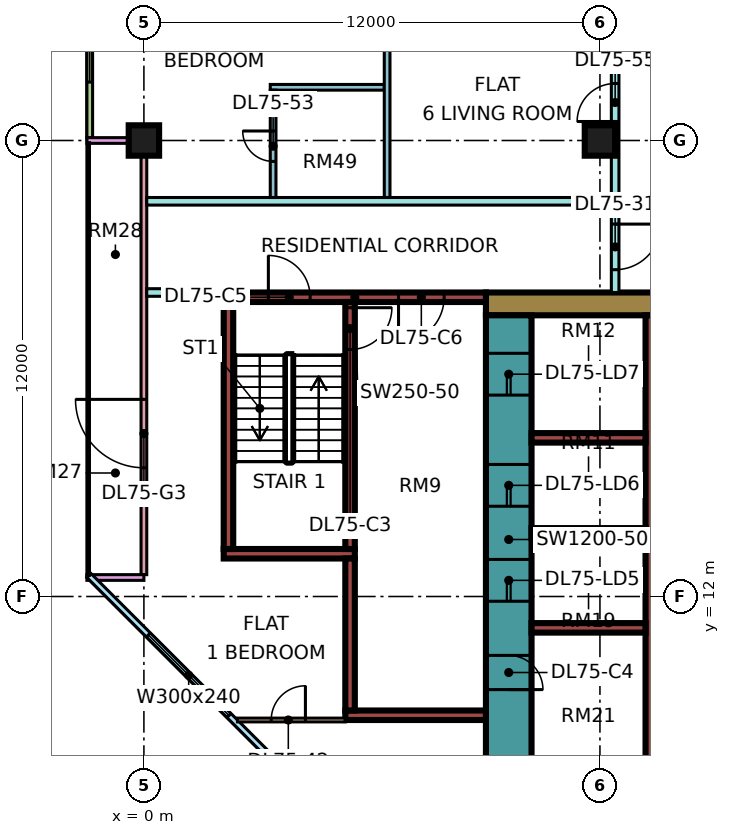
"""IFC4 building model, lengths in metres.
Left out: names, types, materials, properties, quantities, classifications, styles, units other than length and angle.
Written with IfcOpenShell. Run it as: python <this file> out.ifc"""

import sys

from ifc_helpers import new_model, si_unit, direction, frame, frame_2d, origin, origin_2d, place, context, subcontext, project, spatial, rectangle, extrude, element, fill, save


model = new_model("IFC4")
c1 = context("Model", 3, precision=1e-05, world=origin(), true_north=direction((0.0, 1.0)))
c2 = subcontext(c1, "Body", "Model", "MODEL_VIEW")
j1 = project(units=[si_unit("LENGTHUNIT", "METRE"), si_unit("PLANEANGLEUNIT", "RADIAN")], contexts=[c1])
p1 = place(None, origin())
s1 = spatial("IfcSite", under=j1, at=p1, CompositionType="ELEMENT")
p2 = place(p1, origin())
s2 = spatial("IfcBuilding", under=s1, at=p2, CompositionType="ELEMENT")
p3 = place(p2, frame((0.0, 0.0, 318.4)))
s3 = spatial("IfcBuildingStorey", under=s2, at=p3, CompositionType="ELEMENT", Elevation=318.4)
for number, where, z_axis, x_axis in (
    (1, (0.0, 24.0, 0.0), (0.0, 0.0, 1.0), (1.0, 0.0, 0.0)),
    (2, (12.0, 24.0, 0.0), (0.0, 0.0, 1.0), (1.0, 0.0, 0.0)),
):
    element("IfcColumn", number, at=place(p3, frame(where, z_axis=z_axis, x_axis=x_axis)), inside=s3, PredefinedType="COLUMN", context=c2, shape_type="SweptSolid", body=[
        extrude(rectangle(XDim=0.8, YDim=0.8, at=origin_2d()), origin(), (0.0, 0.0, 1.0), 3.75),
    ])
p4 = place(p3, frame((9.0, 19.7, 0.0), z_axis=(0.0, 0.0, 1.0), x_axis=(1.0, 0.0, 0.0)))
e3 = element("IfcWall", 3, at=p4, inside=s3, PredefinedType="SHEAR", context=c2, shape_type="SweptSolid", body=[
    extrude(rectangle(XDim=25.0, YDim=0.6, at=frame_2d((12.5, 0.0))), origin(), (0.0, 0.0, 1.0), 3.75),
])
p5 = place(p4, frame((19.1, 0.0, 0.0)))
e4 = element("IfcOpeningElement", 4, at=p5, cuts=e3, PredefinedType="OPENING", context=c2, shape_type="SweptSolid", body=[
    extrude(rectangle(XDim=1.8, YDim=2.4, at=frame_2d((0.9, 1.2))), frame((0.0, 0.31, 0.0), z_axis=(0.0, -1.0, 0.0), x_axis=(1.0, 0.0, 0.0)), (0.0, 0.0, 1.0), 0.62),
])
p6 = place(p3, frame((9.6, 7.6, 0.0), z_axis=(0.0, 0.0, 1.0), x_axis=(0.0, 1.0, 0.0)))
e5 = element("IfcWall", 5, at=p6, inside=s3, PredefinedType="SHEAR", context=c2, shape_type="SweptSolid", body=[
    extrude(rectangle(XDim=11.8, YDim=1.2, at=frame_2d((5.9, 0.0))), origin(), (0.0, 0.0, 1.0), 3.75),
])
p7 = place(p6, frame((4.275, 0.0, 0.0)))
e6 = element("IfcOpeningElement", 6, at=p7, cuts=e5, PredefinedType="OPENING", context=c2, shape_type="SweptSolid", body=[
    extrude(rectangle(XDim=1.1, YDim=2.2, at=frame_2d((0.55, 1.1))), frame((0.0, 0.61, 0.0), z_axis=(0.0, -1.0, 0.0), x_axis=(1.0, 0.0, 0.0)), (0.0, 0.0, 1.0), 1.22),
])
p8 = place(p6, frame((6.775, 0.0, 0.0)))
e7 = element("IfcOpeningElement", 7, at=p8, cuts=e5, PredefinedType="OPENING", context=c2, shape_type="SweptSolid", body=[
    extrude(rectangle(XDim=1.1, YDim=2.2, at=frame_2d((0.55, 1.1))), frame((0.0, 0.61, 0.0), z_axis=(0.0, -1.0, 0.0), x_axis=(1.0, 0.0, 0.0)), (0.0, 0.0, 1.0), 1.22),
])
p9 = place(p6, frame((9.7, 0.0, 0.0)))
e8 = element("IfcOpeningElement", 8, at=p9, cuts=e5, PredefinedType="OPENING", context=c2, shape_type="SweptSolid", body=[
    extrude(rectangle(XDim=1.1, YDim=2.2, at=frame_2d((0.55, 1.1))), frame((0.0, 0.61, 0.0), z_axis=(0.0, -1.0, 0.0), x_axis=(1.0, 0.0, 0.0)), (0.0, 0.0, 1.0), 1.22),
])
p10 = place(p6, frame((1.95, 0.0, 0.0)))
e9 = element("IfcOpeningElement", 9, at=p10, cuts=e5, PredefinedType="OPENING", context=c2, shape_type="SweptSolid", body=[
    extrude(rectangle(XDim=0.9, YDim=2.1, at=frame_2d((0.45, 1.05))), frame((0.0, 0.61, 0.0), z_axis=(0.0, -1.0, 0.0), x_axis=(1.0, 0.0, 0.0)), (0.0, 0.0, 1.0), 1.22),
])
p11 = place(p3, frame((13.325, 7.6, 0.0), z_axis=(0.0, 0.0, 1.0), x_axis=(0.0, 1.0, 0.0)))
e10 = element("IfcWall", 10, at=p11, inside=s3, PredefinedType="SHEAR", context=c2, shape_type="SweptSolid", body=[
    extrude(rectangle(XDim=11.8, YDim=0.25, at=frame_2d((5.9, 0.0))), origin(), (0.0, 0.0, 1.0), 3.75),
])
for number, where, z_axis, x_axis in (
    (11, (10.2, 11.175, 0.0), (0.0, 0.0, 1.0), (1.0, 0.0, 0.0)),
    (12, (10.2, 13.675, 0.0), (0.0, 0.0, 1.0), (1.0, 0.0, 0.0)),
    (13, (10.2, 16.175, 0.0), (0.0, 0.0, 1.0), (1.0, 0.0, 0.0)),
):
    element("IfcWall", number, at=place(p3, frame(where, z_axis=z_axis, x_axis=x_axis)), inside=s3, PredefinedType="SHEAR", context=c2, shape_type="SweptSolid", body=[
        extrude(rectangle(XDim=3.0, YDim=0.25, at=frame_2d((1.5, 0.0))), origin(), (0.0, 0.0, 1.0), 3.75),
    ])
p12 = place(p3, frame((2.1, 19.875, 0.0), z_axis=(0.0, 0.0, 1.0), x_axis=(1.0, 0.0, 0.0)))
e14 = element("IfcWall", 14, at=p12, inside=s3, PredefinedType="SHEAR", context=c2, shape_type="SweptSolid", body=[
    extrude(rectangle(XDim=6.9, YDim=0.25, at=frame_2d((3.45, 0.0))), origin(), (0.0, 0.0, 1.0), 3.75),
])
p13 = place(p12, frame((1.175, 0.0, 0.0)))
e15 = element("IfcOpeningElement", 15, at=p13, cuts=e14, PredefinedType="OPENING", context=c2, shape_type="SweptSolid", body=[
    extrude(rectangle(XDim=1.1, YDim=2.2, at=frame_2d((0.55, 1.1))), frame((0.0, 0.135, 0.0), z_axis=(0.0, -1.0, 0.0), x_axis=(1.0, 0.0, 0.0)), (0.0, 0.0, 1.0), 0.27),
])
p14 = place(p12, frame((4.6, 0.0, 0.0)))
e16 = element("IfcOpeningElement", 16, at=p14, cuts=e14, PredefinedType="OPENING", context=c2, shape_type="SweptSolid", body=[
    extrude(rectangle(XDim=1.2, YDim=2.2, at=frame_2d((0.6, 1.1))), frame((0.0, 0.135, 0.0), z_axis=(0.0, -1.0, 0.0), x_axis=(1.0, 0.0, 0.0)), (0.0, 0.0, 1.0), 0.27),
])
p15 = place(p3, frame((2.1, 13.125, 0.0), z_axis=(0.0, 0.0, 1.0), x_axis=(1.0, 0.0, 0.0)))
e17 = element("IfcWall", 17, at=p15, inside=s3, PredefinedType="SHEAR", context=c2, shape_type="SweptSolid", body=[
    extrude(rectangle(XDim=3.45, YDim=0.25, at=frame_2d((1.725, 0.0))), origin(), (0.0, 0.0, 1.0), 3.75),
])
p16 = place(p3, frame((2.225, 13.25, 0.0), z_axis=(0.0, 0.0, 1.0), x_axis=(0.0, 1.0, 0.0)))
e18 = element("IfcWall", 18, at=p16, inside=s3, PredefinedType="SHEAR", context=c2, shape_type="SweptSolid", body=[
    extrude(rectangle(XDim=6.5, YDim=0.25, at=frame_2d((3.25, 0.0))), origin(), (0.0, 0.0, 1.0), 3.75),
])
p17 = place(p3, frame((5.425, 13.25, 0.0), z_axis=(0.0, 0.0, 1.0), x_axis=(0.0, 1.0, 0.0)))
e19 = element("IfcWall", 19, at=p17, inside=s3, PredefinedType="SHEAR", context=c2, shape_type="SweptSolid", body=[
    extrude(rectangle(XDim=6.5, YDim=0.25, at=frame_2d((3.25, 0.0))), origin(), (0.0, 0.0, 1.0), 3.75),
])
p18 = place(p17, frame((5.25, 0.0, 0.0)))
e20 = element("IfcOpeningElement", 20, at=p18, cuts=e19, PredefinedType="OPENING", context=c2, shape_type="SweptSolid", body=[
    extrude(rectangle(XDim=1.1, YDim=2.2, at=frame_2d((0.55, 1.1))), frame((0.0, 0.135, 0.0), z_axis=(0.0, -1.0, 0.0), x_axis=(1.0, 0.0, 0.0)), (0.0, 0.0, 1.0), 0.27),
])
p19 = place(p3, frame((5.3, 8.875, 0.0), z_axis=(0.0, 0.0, 1.0), x_axis=(1.0, 0.0, 0.0)))
e21 = element("IfcWall", 21, at=p19, inside=s3, PredefinedType="SHEAR", context=c2, shape_type="SweptSolid", body=[
    extrude(rectangle(XDim=3.7, YDim=0.25, at=frame_2d((1.85, 0.0))), origin(), (0.0, 0.0, 1.0), 3.75),
])
p20 = place(p3, frame((5.425, 9.0, 0.0), z_axis=(0.0, 0.0, 1.0), x_axis=(0.0, 1.0, 0.0)))
e22 = element("IfcWall", 22, at=p20, inside=s3, PredefinedType="SHEAR", context=c2, shape_type="SweptSolid", body=[
    extrude(rectangle(XDim=4.0, YDim=0.25, at=frame_2d((2.0, 0.0))), origin(), (0.0, 0.0, 1.0), 3.75),
])
p21 = place(p3, frame((-1.425, 35.925, 0.0), z_axis=(0.0, 0.0, 1.0), x_axis=(0.0, -1.0, 0.0)))
e23 = element("IfcWall", 23, at=p21, inside=s3, PredefinedType="SOLIDWALL", context=c2, shape_type="SweptSolid", body=[
    extrude(rectangle(XDim=11.85, YDim=0.15, at=frame_2d((5.925, 0.0))), origin(), (0.0, 0.0, 1.0), 3.3),
])
p22 = place(p21, frame((0.562, 0.0, 0.45)))
e24 = element("IfcOpeningElement", 24, at=p22, cuts=e23, PredefinedType="OPENING", context=c2, shape_type="SweptSolid", body=[
    extrude(rectangle(XDim=1.8, YDim=2.4, at=frame_2d((0.9, 1.2))), frame((0.0, 0.085, 0.0), z_axis=(0.0, -1.0, 0.0), x_axis=(1.0, 0.0, 0.0)), (0.0, 0.0, 1.0), 0.17),
])
p23 = place(p21, frame((3.525, 0.0, 0.45)))
e25 = element("IfcOpeningElement", 25, at=p23, cuts=e23, PredefinedType="OPENING", context=c2, shape_type="SweptSolid", body=[
    extrude(rectangle(XDim=1.8, YDim=2.4, at=frame_2d((0.9, 1.2))), frame((0.0, 0.085, 0.0), z_axis=(0.0, -1.0, 0.0), x_axis=(1.0, 0.0, 0.0)), (0.0, 0.0, 1.0), 0.17),
])
p24 = place(p21, frame((7.387, 0.0, 0.45)))
e26 = element("IfcOpeningElement", 26, at=p24, cuts=e23, PredefinedType="OPENING", context=c2, shape_type="SweptSolid", body=[
    extrude(rectangle(XDim=3.0, YDim=2.4, at=frame_2d((1.5, 1.2))), frame((0.0, 0.085, 0.0), z_axis=(0.0, -1.0, 0.0), x_axis=(1.0, 0.0, 0.0)), (0.0, 0.0, 1.0), 0.17),
])
p25 = place(p3, frame((0.0, 23.925, 0.0), z_axis=(0.0, 0.0, 1.0), x_axis=(0.0, -1.0, 0.0)))
e27 = element("IfcWall", 27, at=p25, inside=s3, PredefinedType="SOLIDWALL", context=c2, shape_type="SweptSolid", body=[
    extrude(rectangle(XDim=11.35, YDim=0.15, at=frame_2d((5.675, 0.0))), origin(), (0.0, 0.0, 1.0), 3.3),
])
p26 = place(p25, frame((6.738, 0.0, 0.0)))
e28 = element("IfcOpeningElement", 28, at=p26, cuts=e27, PredefinedType="OPENING", context=c2, shape_type="SweptSolid", body=[
    extrude(rectangle(XDim=1.8, YDim=2.4, at=frame_2d((0.9, 1.2))), frame((0.0, 0.085, 0.0), z_axis=(0.0, -1.0, 0.0), x_axis=(1.0, 0.0, 0.0)), (0.0, 0.0, 1.0), 0.17),
])
for number, where, z_axis, x_axis in (
    (29, (-1.5, 24.0, 0.0), (0.0, 0.0, 1.0), (1.0, 0.0, 0.0)),
    (30, (-1.5, 12.5, 0.0), (0.0, 0.0, 1.0), (1.0, 0.0, 0.0)),
):
    element("IfcWall", number, at=place(p3, frame(where, z_axis=z_axis, x_axis=x_axis)), inside=s3, PredefinedType="SOLIDWALL", context=c2, shape_type="SweptSolid", body=[
        extrude(rectangle(XDim=1.5, YDim=0.15, at=frame_2d((0.75, 0.0))), origin(), (0.0, 0.0, 1.0), 3.3),
    ])
p27 = place(p3, frame((-1.447, 12.553, 0.0), z_axis=(0.0, 0.0, 1.0), x_axis=(0.707106781187, -0.707106781187, 0.0)))
e31 = element("IfcWall", 31, at=p27, inside=s3, PredefinedType="SOLIDWALL", context=c2, shape_type="SweptSolid", body=[
    extrude(rectangle(XDim=19.799, YDim=0.15, at=frame_2d((9.899, 0.0))), origin(), (0.0, 0.0, 1.0), 3.3),
])
p28 = place(p27, frame((2.212, 0.0, 0.45)))
e32 = element("IfcOpeningElement", 32, at=p28, cuts=e31, PredefinedType="OPENING", context=c2, shape_type="SweptSolid", body=[
    extrude(rectangle(XDim=3.0, YDim=2.4, at=frame_2d((1.5, 1.2))), frame((0.0, 0.085, 0.0), z_axis=(0.0, -1.0, 0.0), x_axis=(1.0, 0.0, 0.0)), (0.0, 0.0, 1.0), 0.17),
])
p29 = place(p27, frame((10.216, 0.0, 0.45)))
e33 = element("IfcOpeningElement", 33, at=p29, cuts=e31, PredefinedType="OPENING", context=c2, shape_type="SweptSolid", body=[
    extrude(rectangle(XDim=3.0, YDim=2.4, at=frame_2d((1.5, 1.2))), frame((0.0, 0.085, 0.0), z_axis=(0.0, -1.0, 0.0), x_axis=(1.0, 0.0, 0.0)), (0.0, 0.0, 1.0), 0.17),
])
p30 = place(p3, frame((0.074, 20.0, 0.0), z_axis=(0.0, 0.0, 1.0), x_axis=(1.0, 0.0, 0.0)))
e34 = element("IfcWall", 34, at=p30, inside=s3, PredefinedType="PARTITIONING", context=c2, shape_type="SweptSolid", body=[
    extrude(rectangle(XDim=2.026, YDim=0.2, at=frame_2d((1.013, 0.0))), origin(), (0.0, 0.0, 1.0), 3.3),
])
p31 = place(p3, frame((0.074, 22.4, 0.0), z_axis=(0.0, 0.0, 1.0), x_axis=(1.0, 0.0, 0.0)))
e35 = element("IfcWall", 35, at=p31, inside=s3, PredefinedType="PARTITIONING", context=c2, shape_type="SweptSolid", body=[
    extrude(rectangle(XDim=12.226, YDim=0.2, at=frame_2d((6.113, 0.0))), origin(), (0.0, 0.0, 1.0), 3.3),
])
p32 = place(p3, frame((2.461, 8.75, 0.0), z_axis=(0.0, 0.0, 1.0), x_axis=(1.0, 0.0, 0.0)))
e36 = element("IfcWall", 36, at=p32, inside=s3, PredefinedType="PARTITIONING", context=c2, shape_type="SweptSolid", body=[
    extrude(rectangle(XDim=2.839, YDim=0.1, at=frame_2d((1.419, 0.0))), origin(), (0.0, 0.0, 1.0), 3.3),
])
p33 = place(p32, frame((0.889, 0.0, 0.0)))
e37 = element("IfcOpeningElement", 37, at=p33, cuts=e36, PredefinedType="OPENING", context=c2, shape_type="SweptSolid", body=[
    extrude(rectangle(XDim=0.9, YDim=2.1, at=frame_2d((0.45, 1.05))), frame((0.0, 0.06, 0.0), z_axis=(0.0, -1.0, 0.0), x_axis=(1.0, 0.0, 0.0)), (0.0, 0.0, 1.0), 0.12),
])
p34 = place(p3, frame((3.325, 25.4, 0.0), z_axis=(0.0, 0.0, 1.0), x_axis=(1.0, 0.0, 0.0)))
e38 = element("IfcWall", 38, at=p34, inside=s3, PredefinedType="PARTITIONING", context=c2, shape_type="SweptSolid", body=[
    extrude(rectangle(XDim=3.0, YDim=0.15, at=frame_2d((1.5, 0.0))), origin(), (0.0, 0.0, 1.0), 3.3),
])
p35 = place(p3, frame((3.4, 22.5, 0.0), z_axis=(0.0, 0.0, 1.0), x_axis=(0.0, 1.0, 0.0)))
e39 = element("IfcWall", 39, at=p35, inside=s3, PredefinedType="PARTITIONING", context=c2, shape_type="SweptSolid", body=[
    extrude(rectangle(XDim=2.825, YDim=0.15, at=frame_2d((1.413, 0.0))), origin(), (0.0, 0.0, 1.0), 3.3),
])
p36 = place(p35, frame((0.95, 0.0, 0.0)))
e40 = element("IfcOpeningElement", 40, at=p36, cuts=e39, PredefinedType="OPENING", context=c2, shape_type="SweptSolid", body=[
    extrude(rectangle(XDim=0.8, YDim=2.1, at=frame_2d((0.4, 1.05))), frame((0.0, 0.085, 0.0), z_axis=(0.0, -1.0, 0.0), x_axis=(1.0, 0.0, 0.0)), (0.0, 0.0, 1.0), 0.17),
])
p37 = place(p3, frame((6.4, 22.5, 0.0), z_axis=(0.0, 0.0, 1.0), x_axis=(0.0, 1.0, 0.0)))
e41 = element("IfcWall", 41, at=p37, inside=s3, PredefinedType="PARTITIONING", context=c2, shape_type="SweptSolid", body=[
    extrude(rectangle(XDim=7.55, YDim=0.15, at=frame_2d((3.775, 0.0))), origin(), (0.0, 0.0, 1.0), 3.3),
])
p38 = place(p3, frame((12.4, 20.0, 0.0), z_axis=(0.0, 0.0, 1.0), x_axis=(0.0, 1.0, 0.0)))
e42 = element("IfcWall", 42, at=p38, inside=s3, PredefinedType="PARTITIONING", context=c2, shape_type="SweptSolid", body=[
    extrude(rectangle(XDim=33.926, YDim=0.2, at=frame_2d((16.963, 0.0))), origin(), (0.0, 0.0, 1.0), 3.3),
])
p39 = place(p38, frame((31.8, 0.0, 0.0)))
e43 = element("IfcOpeningElement", 43, at=p39, cuts=e42, PredefinedType="OPENING", context=c2, shape_type="SweptSolid", body=[
    extrude(rectangle(XDim=1.0, YDim=2.1, at=frame_2d((0.5, 1.05))), frame((0.0, 0.11, 0.0), z_axis=(0.0, -1.0, 0.0), x_axis=(1.0, 0.0, 0.0)), (0.0, 0.0, 1.0), 0.22),
])
p40 = place(p38, frame((0.6, 0.0, 0.0)))
e44 = element("IfcOpeningElement", 44, at=p40, cuts=e42, PredefinedType="OPENING", context=c2, shape_type="SweptSolid", body=[
    extrude(rectangle(XDim=1.2, YDim=2.1, at=frame_2d((0.6, 1.05))), frame((0.0, 0.11, 0.0), z_axis=(0.0, -1.0, 0.0), x_axis=(1.0, 0.0, 0.0)), (0.0, 0.0, 1.0), 0.22),
])
p41 = place(p38, frame((4.5, 0.0, 0.0)))
e45 = element("IfcOpeningElement", 45, at=p41, cuts=e42, PredefinedType="OPENING", context=c2, shape_type="SweptSolid", body=[
    extrude(rectangle(XDim=1.0, YDim=2.1, at=frame_2d((0.5, 1.05))), frame((0.0, 0.11, 0.0), z_axis=(0.0, -1.0, 0.0), x_axis=(1.0, 0.0, 0.0)), (0.0, 0.0, 1.0), 0.22),
])
p42 = place(p24, origin())
e46 = element("IfcWindow", 46, at=p42, inside=s3, PartitioningType="SINGLE_PANEL", PredefinedType="WINDOW", context=c2, shape_type="SweptSolid", body=[
    extrude(rectangle(XDim=3.0, YDim=2.4, at=frame_2d((1.5, 1.2))), frame((0.0, 0.03, 0.0), z_axis=(0.0, -1.0, 0.0), x_axis=(1.0, 0.0, 0.0)), (0.0, 0.0, 1.0), 0.06),
])
fill(e26, e46)
p43 = place(p26, frame((1.8, 0.0, 0.0), z_axis=(0.0, 0.0, 1.0), x_axis=(-1.0, 0.0, 0.0)))
e47 = element("IfcDoor", 47, at=p43, inside=s3, OperationType="DOUBLE_DOOR_SINGLE_SWING", PredefinedType="DOOR", context=c2, shape_type="SweptSolid", body=[
    extrude(rectangle(XDim=1.8, YDim=2.4, at=frame_2d((0.9, 1.2))), frame((0.0, 0.025, 0.0), z_axis=(0.0, -1.0, 0.0), x_axis=(1.0, 0.0, 0.0)), (0.0, 0.0, 1.0), 0.05),
])
fill(e28, e47)
p44 = place(p28, origin())
e48 = element("IfcWindow", 48, at=p44, inside=s3, PartitioningType="SINGLE_PANEL", PredefinedType="WINDOW", context=c2, shape_type="SweptSolid", body=[
    extrude(rectangle(XDim=3.0, YDim=2.4, at=frame_2d((1.5, 1.2))), frame((0.0, 0.03, 0.0), z_axis=(0.0, -1.0, 0.0), x_axis=(1.0, 0.0, 0.0)), (0.0, 0.0, 1.0), 0.06),
])
fill(e32, e48)
p45 = place(p7, origin())
e49 = element("IfcDoor", 49, at=p45, inside=s3, OperationType="DOUBLE_DOOR_SLIDING", PredefinedType="DOOR", context=c2, shape_type="SweptSolid", body=[
    extrude(rectangle(XDim=1.1, YDim=2.2, at=frame_2d((0.55, 1.1))), frame((0.0, 0.025, 0.0), z_axis=(0.0, -1.0, 0.0), x_axis=(1.0, 0.0, 0.0)), (0.0, 0.0, 1.0), 0.05),
])
fill(e6, e49)
p46 = place(p8, origin())
e50 = element("IfcDoor", 50, at=p46, inside=s3, OperationType="DOUBLE_DOOR_SLIDING", PredefinedType="DOOR", context=c2, shape_type="SweptSolid", body=[
    extrude(rectangle(XDim=1.1, YDim=2.2, at=frame_2d((0.55, 1.1))), frame((0.0, 0.025, 0.0), z_axis=(0.0, -1.0, 0.0), x_axis=(1.0, 0.0, 0.0)), (0.0, 0.0, 1.0), 0.05),
])
fill(e7, e50)
p47 = place(p9, origin())
e51 = element("IfcDoor", 51, at=p47, inside=s3, OperationType="DOUBLE_DOOR_SLIDING", PredefinedType="DOOR", context=c2, shape_type="SweptSolid", body=[
    extrude(rectangle(XDim=1.1, YDim=2.2, at=frame_2d((0.55, 1.1))), frame((0.0, 0.025, 0.0), z_axis=(0.0, -1.0, 0.0), x_axis=(1.0, 0.0, 0.0)), (0.0, 0.0, 1.0), 0.05),
])
fill(e8, e51)
p48 = place(p18, origin())
e52 = element("IfcDoor", 52, at=p48, inside=s3, OperationType="SINGLE_SWING_RIGHT", PredefinedType="DOOR", context=c2, shape_type="SweptSolid", body=[
    extrude(rectangle(XDim=1.1, YDim=2.2, at=frame_2d((0.55, 1.1))), frame((0.0, 0.025, 0.0), z_axis=(0.0, -1.0, 0.0), x_axis=(1.0, 0.0, 0.0)), (0.0, 0.0, 1.0), 0.05),
])
fill(e20, e52)
p49 = place(p10, frame((0.9, 0.0, 0.0), z_axis=(0.0, 0.0, 1.0), x_axis=(-1.0, 0.0, 0.0)))
e53 = element("IfcDoor", 53, at=p49, inside=s3, OperationType="SINGLE_SWING_LEFT", PredefinedType="DOOR", context=c2, shape_type="SweptSolid", body=[
    extrude(rectangle(XDim=0.9, YDim=2.1, at=frame_2d((0.45, 1.05))), frame((0.0, 0.025, 0.0), z_axis=(0.0, -1.0, 0.0), x_axis=(1.0, 0.0, 0.0)), (0.0, 0.0, 1.0), 0.05),
])
fill(e9, e53)
p50 = place(p13, origin())
e54 = element("IfcDoor", 54, at=p50, inside=s3, OperationType="SINGLE_SWING_LEFT", PredefinedType="DOOR", context=c2, shape_type="SweptSolid", body=[
    extrude(rectangle(XDim=1.1, YDim=2.2, at=frame_2d((0.55, 1.1))), frame((0.0, 0.025, 0.0), z_axis=(0.0, -1.0, 0.0), x_axis=(1.0, 0.0, 0.0)), (0.0, 0.0, 1.0), 0.05),
])
fill(e15, e54)
p51 = place(p14, frame((1.2, 0.0, 0.0), z_axis=(0.0, 0.0, 1.0), x_axis=(-1.0, 0.0, 0.0)))
e55 = element("IfcDoor", 55, at=p51, inside=s3, OperationType="SINGLE_SWING_LEFT", PredefinedType="DOOR", context=c2, shape_type="SweptSolid", body=[
    extrude(rectangle(XDim=1.2, YDim=2.2, at=frame_2d((0.6, 1.1))), frame((0.0, 0.025, 0.0), z_axis=(0.0, -1.0, 0.0), x_axis=(1.0, 0.0, 0.0)), (0.0, 0.0, 1.0), 0.05),
])
fill(e16, e55)
p52 = place(p40, origin())
e56 = element("IfcDoor", 56, at=p52, inside=s3, OperationType="SINGLE_SWING_RIGHT", PredefinedType="DOOR", context=c2, shape_type="SweptSolid", body=[
    extrude(rectangle(XDim=1.2, YDim=2.1, at=frame_2d((0.6, 1.05))), frame((0.0, 0.025, 0.0), z_axis=(0.0, -1.0, 0.0), x_axis=(1.0, 0.0, 0.0)), (0.0, 0.0, 1.0), 0.05),
])
fill(e44, e56)
p53 = place(p33, frame((0.9, 0.0, 0.0), z_axis=(0.0, 0.0, 1.0), x_axis=(-1.0, 0.0, 0.0)))
e57 = element("IfcDoor", 57, at=p53, inside=s3, OperationType="SINGLE_SWING_RIGHT", PredefinedType="DOOR", context=c2, shape_type="SweptSolid", body=[
    extrude(rectangle(XDim=0.9, YDim=2.1, at=frame_2d((0.45, 1.05))), frame((0.0, 0.025, 0.0), z_axis=(0.0, -1.0, 0.0), x_axis=(1.0, 0.0, 0.0)), (0.0, 0.0, 1.0), 0.05),
])
fill(e37, e57)
p54 = place(p36, frame((0.8, 0.0, 0.0), z_axis=(0.0, 0.0, 1.0), x_axis=(-1.0, 0.0, 0.0)))
e58 = element("IfcDoor", 58, at=p54, inside=s3, OperationType="SINGLE_SWING_RIGHT", PredefinedType="DOOR", context=c2, shape_type="SweptSolid", body=[
    extrude(rectangle(XDim=0.8, YDim=2.1, at=frame_2d((0.4, 1.05))), frame((0.0, 0.025, 0.0), z_axis=(0.0, -1.0, 0.0), x_axis=(1.0, 0.0, 0.0)), (0.0, 0.0, 1.0), 0.05),
])
fill(e40, e58)
p55 = place(p41, origin())
e59 = element("IfcDoor", 59, at=p55, inside=s3, OperationType="SINGLE_SWING_LEFT", PredefinedType="DOOR", context=c2, shape_type="SweptSolid", body=[
    extrude(rectangle(XDim=1.0, YDim=2.1, at=frame_2d((0.5, 1.05))), frame((0.0, 0.025, 0.0), z_axis=(0.0, -1.0, 0.0), x_axis=(1.0, 0.0, 0.0)), (0.0, 0.0, 1.0), 0.05),
])
fill(e45, e59)
save(model, sys.argv[1])
